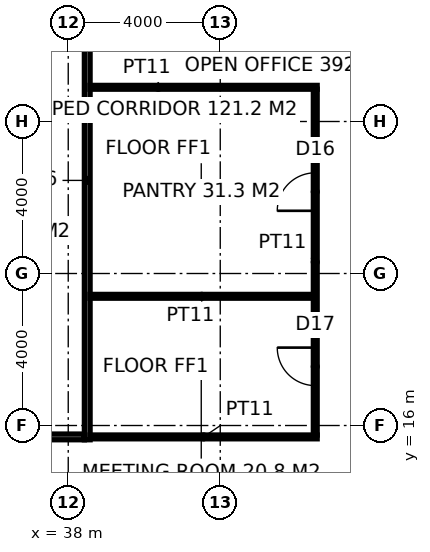
"""IFC4 building model, lengths in metres.
Left out: names, types, materials, properties, quantities, classifications, styles, units other than length and angle.
Written with IfcOpenShell. Run it as: python <this file> out.ifc"""

import sys

from ifc_helpers import new_model, si_unit, direction, frame, frame_2d, origin, place, context, subcontext, project, spatial, rectangle, extrude, element, fill, save


model = new_model("IFC4")
c1 = context("Model", 3, precision=1e-05, world=origin(), true_north=direction((0.0, 1.0)))
c2 = subcontext(c1, "Body", "Model", "MODEL_VIEW")
j1 = project(units=[si_unit("LENGTHUNIT", "METRE"), si_unit("PLANEANGLEUNIT", "RADIAN")], contexts=[c1])
p1 = place(None, origin())
s1 = spatial("IfcSite", under=j1, at=p1, CompositionType="ELEMENT")
p2 = place(p1, origin())
s2 = spatial("IfcBuilding", under=s1, at=p2, CompositionType="ELEMENT")
p3 = place(p2, frame((0.0, 0.0, 246.2)))
s3 = spatial("IfcBuildingStorey", under=s2, at=p3, CompositionType="ELEMENT", Elevation=246.2)
p4 = place(p3, frame((38.5, 15.625, 0.0), z_axis=(0.0, 0.0, 1.0), x_axis=(0.0, 1.0, 0.0)))
e1 = element("IfcWall", 1, at=p4, inside=s3, PredefinedType="PARTITIONING", context=c2, shape_type="SweptSolid", body=[
    extrude(rectangle(XDim=22.75, YDim=0.15, at=frame_2d((11.375, 0.0))), origin(), (0.0, 0.0, 1.0), 3.85),
])
p5 = place(p4, frame((10.475, 0.0, 0.0)))
e2 = element("IfcOpeningElement", 2, at=p5, cuts=e1, PredefinedType="OPENING", context=c2, shape_type="SweptSolid", body=[
    extrude(rectangle(XDim=1.8, YDim=2.4, at=frame_2d((0.9, 1.2))), frame((0.0, 0.085, 0.0), z_axis=(0.0, -1.0, 0.0), x_axis=(1.0, 0.0, 0.0)), (0.0, 0.0, 1.0), 0.17),
])
p6 = place(p3, frame((17.5, 15.7, 0.0), z_axis=(0.0, 0.0, 1.0), x_axis=(1.0, 0.0, 0.0)))
e3 = element("IfcWall", 3, at=p6, inside=s3, PredefinedType="PARTITIONING", context=c2, shape_type="SweptSolid", body=[
    extrude(rectangle(XDim=20.925, YDim=0.15, at=frame_2d((10.462, 0.0))), origin(), (0.0, 0.0, 1.0), 3.85),
])
p7 = place(p3, frame((38.575, 15.7, 0.0), z_axis=(0.0, 0.0, 1.0), x_axis=(1.0, 0.0, 0.0)))
e4 = element("IfcWall", 4, at=p7, inside=s3, PredefinedType="PARTITIONING", context=c2, shape_type="SweptSolid", body=[
    extrude(rectangle(XDim=5.975, YDim=0.1, at=frame_2d((2.988, 0.0))), origin(), (0.0, 0.0, 1.0), 3.85),
])
p8 = place(p3, frame((38.575, 19.4, 0.0), z_axis=(0.0, 0.0, 1.0), x_axis=(1.0, 0.0, 0.0)))
e5 = element("IfcWall", 5, at=p8, inside=s3, PredefinedType="PARTITIONING", context=c2, shape_type="SweptSolid", body=[
    extrude(rectangle(XDim=5.875, YDim=0.1, at=frame_2d((2.938, 0.0))), origin(), (0.0, 0.0, 1.0), 3.85),
])
p9 = place(p3, frame((38.575, 24.9, 0.0), z_axis=(0.0, 0.0, 1.0), x_axis=(1.0, 0.0, 0.0)))
e6 = element("IfcWall", 6, at=p9, inside=s3, PredefinedType="PARTITIONING", context=c2, shape_type="SweptSolid", body=[
    extrude(rectangle(XDim=5.975, YDim=0.1, at=frame_2d((2.988, 0.0))), origin(), (0.0, 0.0, 1.0), 3.85),
])
p10 = place(p3, frame((44.5, 15.75, 0.0), z_axis=(0.0, 0.0, 1.0), x_axis=(0.0, 1.0, 0.0)))
e7 = element("IfcWall", 7, at=p10, inside=s3, PredefinedType="PARTITIONING", context=c2, shape_type="SweptSolid", body=[
    extrude(rectangle(XDim=9.1, YDim=0.1, at=frame_2d((4.55, 0.0))), origin(), (0.0, 0.0, 1.0), 3.85),
])
p11 = place(p10, frame((1.3, 0.0, 0.0)))
e8 = element("IfcOpeningElement", 8, at=p11, cuts=e7, PredefinedType="OPENING", context=c2, shape_type="SweptSolid", body=[
    extrude(rectangle(XDim=1.0, YDim=2.2, at=frame_2d((0.5, 1.1))), frame((0.0, 0.06, 0.0), z_axis=(0.0, -1.0, 0.0), x_axis=(1.0, 0.0, 0.0)), (0.0, 0.0, 1.0), 0.12),
])
p12 = place(p10, frame((5.9, 0.0, 0.0)))
e9 = element("IfcOpeningElement", 9, at=p12, cuts=e7, PredefinedType="OPENING", context=c2, shape_type="SweptSolid", body=[
    extrude(rectangle(XDim=1.0, YDim=2.2, at=frame_2d((0.5, 1.1))), frame((0.0, 0.06, 0.0), z_axis=(0.0, -1.0, 0.0), x_axis=(1.0, 0.0, 0.0)), (0.0, 0.0, 1.0), 0.12),
])
p13 = place(p11, origin())
e10 = element("IfcDoor", 10, at=p13, inside=s3, OperationType="SINGLE_SWING_RIGHT", PredefinedType="DOOR", context=c2, shape_type="SweptSolid", body=[
    extrude(rectangle(XDim=1.0, YDim=2.2, at=frame_2d((0.5, 1.1))), frame((0.0, 0.025, 0.0), z_axis=(0.0, -1.0, 0.0), x_axis=(1.0, 0.0, 0.0)), (0.0, 0.0, 1.0), 0.05),
])
fill(e8, e10)
p14 = place(p12, origin())
e11 = element("IfcDoor", 11, at=p14, inside=s3, OperationType="SINGLE_SWING_LEFT", PredefinedType="DOOR", context=c2, shape_type="SweptSolid", body=[
    extrude(rectangle(XDim=1.0, YDim=2.2, at=frame_2d((0.5, 1.1))), frame((0.0, 0.025, 0.0), z_axis=(0.0, -1.0, 0.0), x_axis=(1.0, 0.0, 0.0)), (0.0, 0.0, 1.0), 0.05),
])
fill(e9, e11)
save(model, sys.argv[1])
